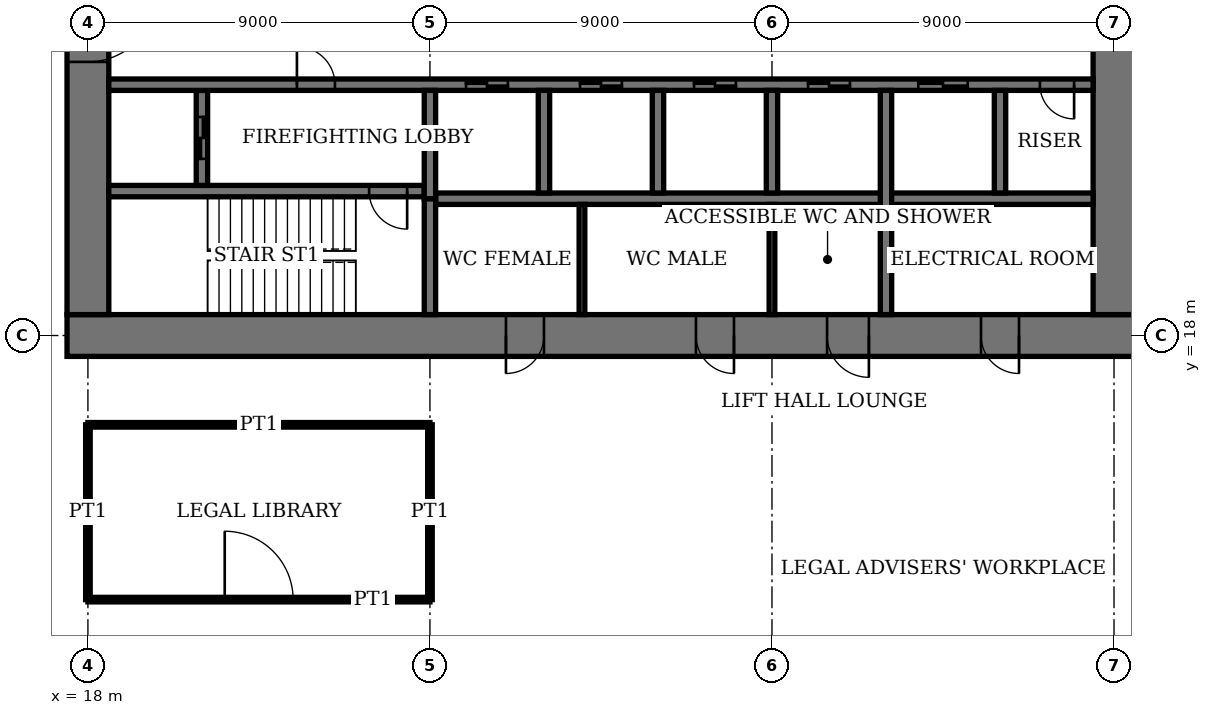
"""IFC4 building model, lengths in metres.
Left out: names, types, materials, properties, quantities, classifications, styles, units other than length and angle.
Written with IfcOpenShell. Run it as: python <this file> out.ifc"""

import sys

from ifc_helpers import new_model, si_unit, direction, frame, frame_2d, origin, place, context, subcontext, project, spatial, rectangle, extrude, element, fill, save


model = new_model("IFC4")
c1 = context("Model", 3, precision=1e-05, world=origin(), true_north=direction((0.0, 1.0)))
c2 = subcontext(c1, "Body", "Model", "MODEL_VIEW")
j1 = project(units=[si_unit("LENGTHUNIT", "METRE"), si_unit("PLANEANGLEUNIT", "RADIAN")], contexts=[c1])
p1 = place(None, origin())
s1 = spatial("IfcSite", under=j1, at=p1, CompositionType="ELEMENT")
p2 = place(p1, origin())
s2 = spatial("IfcBuilding", under=s1, at=p2, CompositionType="ELEMENT")
p3 = place(p2, frame((0.0, 0.0, 259.4)))
s3 = spatial("IfcBuildingStorey", under=s2, at=p3, CompositionType="ELEMENT", Elevation=259.4)
p4 = place(p3, frame((17.45, 18.0, 0.0), z_axis=(0.0, 0.0, 1.0), x_axis=(1.0, 0.0, 0.0)))
e1 = element("IfcWall", 1, at=p4, inside=s3, PredefinedType="SHEAR", context=c2, shape_type="SweptSolid", body=[
    extrude(rectangle(XDim=28.1, YDim=1.1, at=frame_2d((14.05, 0.0))), origin(), (0.0, 0.0, 1.0), 4.0),
])
p5 = place(p4, frame((11.55, 0.0, 0.0)))
e2 = element("IfcOpeningElement", 2, at=p5, cuts=e1, PredefinedType="OPENING", context=c2, shape_type="SweptSolid", body=[
    extrude(rectangle(XDim=1.0, YDim=2.4, at=frame_2d((0.5, 1.2))), frame((0.0, 0.56, 0.0), z_axis=(0.0, -1.0, 0.0), x_axis=(1.0, 0.0, 0.0)), (0.0, 0.0, 1.0), 1.12),
])
p6 = place(p4, frame((16.55, 0.0, 0.0)))
e3 = element("IfcOpeningElement", 3, at=p6, cuts=e1, PredefinedType="OPENING", context=c2, shape_type="SweptSolid", body=[
    extrude(rectangle(XDim=1.0, YDim=2.4, at=frame_2d((0.5, 1.2))), frame((0.0, 0.56, 0.0), z_axis=(0.0, -1.0, 0.0), x_axis=(1.0, 0.0, 0.0)), (0.0, 0.0, 1.0), 1.12),
])
p7 = place(p4, frame((20.0, 0.0, 0.0)))
e4 = element("IfcOpeningElement", 4, at=p7, cuts=e1, PredefinedType="OPENING", context=c2, shape_type="SweptSolid", body=[
    extrude(rectangle(XDim=1.1, YDim=2.4, at=frame_2d((0.55, 1.2))), frame((0.0, 0.56, 0.0), z_axis=(0.0, -1.0, 0.0), x_axis=(1.0, 0.0, 0.0)), (0.0, 0.0, 1.0), 1.12),
])
p8 = place(p4, frame((24.05, 0.0, 0.0)))
e5 = element("IfcOpeningElement", 5, at=p8, cuts=e1, PredefinedType="OPENING", context=c2, shape_type="SweptSolid", body=[
    extrude(rectangle(XDim=1.0, YDim=2.4, at=frame_2d((0.5, 1.2))), frame((0.0, 0.56, 0.0), z_axis=(0.0, -1.0, 0.0), x_axis=(1.0, 0.0, 0.0)), (0.0, 0.0, 1.0), 1.12),
])
p9 = place(p3, frame((18.0, 35.45, 0.0), z_axis=(0.0, 0.0, 1.0), x_axis=(0.0, -1.0, 0.0)))
e6 = element("IfcWall", 6, at=p9, inside=s3, PredefinedType="SHEAR", context=c2, shape_type="SweptSolid", body=[
    extrude(rectangle(XDim=16.9, YDim=1.1, at=frame_2d((8.45, 0.0))), origin(), (0.0, 0.0, 1.0), 4.0),
])
p10 = place(p9, frame((8.45, 0.0, 0.0)))
e7 = element("IfcOpeningElement", 7, at=p10, cuts=e6, PredefinedType="OPENING", context=c2, shape_type="SweptSolid", body=[
    extrude(rectangle(XDim=1.8, YDim=2.4, at=frame_2d((0.9, 1.2))), frame((0.0, 0.56, 0.0), z_axis=(0.0, -1.0, 0.0), x_axis=(1.0, 0.0, 0.0)), (0.0, 0.0, 1.0), 1.12),
])
p11 = place(p3, frame((45.0, 18.55, 0.0), z_axis=(0.0, 0.0, 1.0), x_axis=(0.0, 1.0, 0.0)))
e8 = element("IfcWall", 8, at=p11, inside=s3, PredefinedType="SHEAR", context=c2, shape_type="SweptSolid", body=[
    extrude(rectangle(XDim=16.9, YDim=1.1, at=frame_2d((8.45, 0.0))), origin(), (0.0, 0.0, 1.0), 4.0),
])
p12 = place(p11, frame((8.45, 0.0, 0.0)))
e9 = element("IfcOpeningElement", 9, at=p12, cuts=e8, PredefinedType="OPENING", context=c2, shape_type="SweptSolid", body=[
    extrude(rectangle(XDim=1.8, YDim=2.4, at=frame_2d((0.9, 1.2))), frame((0.0, 0.56, 0.0), z_axis=(0.0, -1.0, 0.0), x_axis=(1.0, 0.0, 0.0)), (0.0, 0.0, 1.0), 1.12),
])
p13 = place(p3, frame((18.55, 21.8, 0.0), z_axis=(0.0, 0.0, 1.0), x_axis=(1.0, 0.0, 0.0)))
e10 = element("IfcWall", 10, at=p13, inside=s3, PredefinedType="SHEAR", context=c2, shape_type="SweptSolid", body=[
    extrude(rectangle(XDim=8.3, YDim=0.3, at=frame_2d((4.15, 0.0))), origin(), (0.0, 0.0, 1.0), 4.0),
])
p14 = place(p13, frame((6.85, 0.0, 0.0)))
e11 = element("IfcOpeningElement", 11, at=p14, cuts=e10, PredefinedType="OPENING", context=c2, shape_type="SweptSolid", body=[
    extrude(rectangle(XDim=1.0, YDim=2.4, at=frame_2d((0.5, 1.2))), frame((0.0, 0.16, 0.0), z_axis=(0.0, -1.0, 0.0), x_axis=(1.0, 0.0, 0.0)), (0.0, 0.0, 1.0), 0.32),
])
p15 = place(p3, frame((27.0, 18.55, 0.0), z_axis=(0.0, 0.0, 1.0), x_axis=(0.0, 1.0, 0.0)))
e12 = element("IfcWall", 12, at=p15, inside=s3, PredefinedType="SHEAR", context=c2, shape_type="SweptSolid", body=[
    extrude(rectangle(XDim=3.05, YDim=0.3, at=frame_2d((1.525, 0.0))), origin(), (0.0, 0.0, 1.0), 4.0),
])
p16 = place(p3, frame((21.0, 21.95, 0.0), z_axis=(0.0, 0.0, 1.0), x_axis=(0.0, 1.0, 0.0)))
e13 = element("IfcWall", 13, at=p16, inside=s3, PredefinedType="SHEAR", context=c2, shape_type="SweptSolid", body=[
    extrude(rectangle(XDim=2.5, YDim=0.3, at=frame_2d((1.25, 0.0))), origin(), (0.0, 0.0, 1.0), 4.0),
])
p17 = place(p16, frame((0.7, 0.0, 0.0)))
e14 = element("IfcOpeningElement", 14, at=p17, cuts=e13, PredefinedType="OPENING", context=c2, shape_type="SweptSolid", body=[
    extrude(rectangle(XDim=1.1, YDim=2.4, at=frame_2d((0.55, 1.2))), frame((0.0, 0.16, 0.0), z_axis=(0.0, -1.0, 0.0), x_axis=(1.0, 0.0, 0.0)), (0.0, 0.0, 1.0), 0.32),
])
p18 = place(p3, frame((18.55, 24.6, 0.0), z_axis=(0.0, 0.0, 1.0), x_axis=(1.0, 0.0, 0.0)))
e15 = element("IfcWall", 15, at=p18, inside=s3, PredefinedType="SHEAR", context=c2, shape_type="SweptSolid", body=[
    extrude(rectangle(XDim=25.9, YDim=0.3, at=frame_2d((12.95, 0.0))), origin(), (0.0, 0.0, 1.0), 4.0),
])
p19 = place(p18, frame((4.95, 0.0, 0.0)))
e16 = element("IfcOpeningElement", 16, at=p19, cuts=e15, PredefinedType="OPENING", context=c2, shape_type="SweptSolid", body=[
    extrude(rectangle(XDim=1.0, YDim=2.4, at=frame_2d((0.5, 1.2))), frame((0.0, 0.16, 0.0), z_axis=(0.0, -1.0, 0.0), x_axis=(1.0, 0.0, 0.0)), (0.0, 0.0, 1.0), 0.32),
])
p20 = place(p18, frame((24.5, 0.0, 0.0)))
e17 = element("IfcOpeningElement", 17, at=p20, cuts=e15, PredefinedType="OPENING", context=c2, shape_type="SweptSolid", body=[
    extrude(rectangle(XDim=0.9, YDim=2.1, at=frame_2d((0.45, 1.05))), frame((0.0, 0.16, 0.0), z_axis=(0.0, -1.0, 0.0), x_axis=(1.0, 0.0, 0.0)), (0.0, 0.0, 1.0), 0.32),
])
p21 = place(p18, frame((9.4, 0.0, 0.0)))
e18 = element("IfcOpeningElement", 18, at=p21, cuts=e15, PredefinedType="OPENING", context=c2, shape_type="SweptSolid", body=[
    extrude(rectangle(XDim=1.1, YDim=2.4, at=frame_2d((0.55, 1.2))), frame((0.0, 0.16, 0.0), z_axis=(0.0, -1.0, 0.0), x_axis=(1.0, 0.0, 0.0)), (0.0, 0.0, 1.0), 0.32),
])
p22 = place(p18, frame((12.4, 0.0, 0.0)))
e19 = element("IfcOpeningElement", 19, at=p22, cuts=e15, PredefinedType="OPENING", context=c2, shape_type="SweptSolid", body=[
    extrude(rectangle(XDim=1.1, YDim=2.4, at=frame_2d((0.55, 1.2))), frame((0.0, 0.16, 0.0), z_axis=(0.0, -1.0, 0.0), x_axis=(1.0, 0.0, 0.0)), (0.0, 0.0, 1.0), 0.32),
])
p23 = place(p18, frame((15.4, 0.0, 0.0)))
e20 = element("IfcOpeningElement", 20, at=p23, cuts=e15, PredefinedType="OPENING", context=c2, shape_type="SweptSolid", body=[
    extrude(rectangle(XDim=1.1, YDim=2.4, at=frame_2d((0.55, 1.2))), frame((0.0, 0.16, 0.0), z_axis=(0.0, -1.0, 0.0), x_axis=(1.0, 0.0, 0.0)), (0.0, 0.0, 1.0), 0.32),
])
p24 = place(p18, frame((18.4, 0.0, 0.0)))
e21 = element("IfcOpeningElement", 21, at=p24, cuts=e15, PredefinedType="OPENING", context=c2, shape_type="SweptSolid", body=[
    extrude(rectangle(XDim=1.1, YDim=2.4, at=frame_2d((0.55, 1.2))), frame((0.0, 0.16, 0.0), z_axis=(0.0, -1.0, 0.0), x_axis=(1.0, 0.0, 0.0)), (0.0, 0.0, 1.0), 0.32),
])
p25 = place(p18, frame((21.3, 0.0, 0.0)))
e22 = element("IfcOpeningElement", 22, at=p25, cuts=e15, PredefinedType="OPENING", context=c2, shape_type="SweptSolid", body=[
    extrude(rectangle(XDim=1.3, YDim=2.4, at=frame_2d((0.65, 1.2))), frame((0.0, 0.16, 0.0), z_axis=(0.0, -1.0, 0.0), x_axis=(1.0, 0.0, 0.0)), (0.0, 0.0, 1.0), 0.32),
])
p26 = place(p3, frame((27.15, 21.6, 0.0), z_axis=(0.0, 0.0, 1.0), x_axis=(1.0, 0.0, 0.0)))
e23 = element("IfcWall", 23, at=p26, inside=s3, PredefinedType="SHEAR", context=c2, shape_type="SweptSolid", body=[
    extrude(rectangle(XDim=17.3, YDim=0.3, at=frame_2d((8.65, 0.0))), origin(), (0.0, 0.0, 1.0), 4.0),
])
for number, where, z_axis, x_axis in (
    (24, (30.0, 21.75, 0.0), (0.0, 0.0, 1.0), (0.0, 1.0, 0.0)),
    (25, (33.0, 21.75, 0.0), (0.0, 0.0, 1.0), (0.0, 1.0, 0.0)),
    (26, (36.0, 21.75, 0.0), (0.0, 0.0, 1.0), (0.0, 1.0, 0.0)),
):
    element("IfcWall", number, at=place(p3, frame(where, z_axis=z_axis, x_axis=x_axis)), inside=s3, PredefinedType="SHEAR", context=c2, shape_type="SweptSolid", body=[
        extrude(rectangle(XDim=2.7, YDim=0.3, at=frame_2d((1.35, 0.0))), origin(), (0.0, 0.0, 1.0), 4.0),
    ])
p27 = place(p3, frame((39.0, 18.55, 0.0), z_axis=(0.0, 0.0, 1.0), x_axis=(0.0, 1.0, 0.0)))
e27 = element("IfcWall", 27, at=p27, inside=s3, PredefinedType="SHEAR", context=c2, shape_type="SweptSolid", body=[
    extrude(rectangle(XDim=5.9, YDim=0.3, at=frame_2d((2.95, 0.0))), origin(), (0.0, 0.0, 1.0), 4.0),
])
p28 = place(p3, frame((42.0, 21.75, 0.0), z_axis=(0.0, 0.0, 1.0), x_axis=(0.0, 1.0, 0.0)))
e28 = element("IfcWall", 28, at=p28, inside=s3, PredefinedType="SHEAR", context=c2, shape_type="SweptSolid", body=[
    extrude(rectangle(XDim=2.7, YDim=0.3, at=frame_2d((1.35, 0.0))), origin(), (0.0, 0.0, 1.0), 4.0),
])
p29 = place(p3, frame((27.0, 21.6, 0.0), z_axis=(0.0, 0.0, 1.0), x_axis=(0.0, 1.0, 0.0)))
e29 = element("IfcWall", 29, at=p29, inside=s3, PredefinedType="SHEAR", context=c2, shape_type="SweptSolid", body=[
    extrude(rectangle(XDim=2.85, YDim=0.3, at=frame_2d((1.425, 0.0))), origin(), (0.0, 0.0, 1.0), 4.0),
])
p30 = place(p3, frame((18.0, 11.05, 0.0), z_axis=(0.0, 0.0, 1.0), x_axis=(1.0, 0.0, 0.0)))
e30 = element("IfcWall", 30, at=p30, inside=s3, PredefinedType="PARTITIONING", context=c2, shape_type="SweptSolid", body=[
    extrude(rectangle(XDim=9.0, YDim=0.12, at=frame_2d((4.5, 0.0))), origin(), (0.0, 0.0, 1.0), 3.75),
])
p31 = place(p30, frame((3.6, 0.0, 0.0)))
e31 = element("IfcOpeningElement", 31, at=p31, cuts=e30, PredefinedType="OPENING", context=c2, shape_type="SweptSolid", body=[
    extrude(rectangle(XDim=1.8, YDim=2.4, at=frame_2d((0.9, 1.2))), frame((0.0, 0.07, 0.0), z_axis=(0.0, -1.0, 0.0), x_axis=(1.0, 0.0, 0.0)), (0.0, 0.0, 1.0), 0.14),
])
p32 = place(p3, frame((18.0, 15.65, 0.0), z_axis=(0.0, 0.0, 1.0), x_axis=(1.0, 0.0, 0.0)))
e32 = element("IfcWall", 32, at=p32, inside=s3, PredefinedType="PARTITIONING", context=c2, shape_type="SweptSolid", body=[
    extrude(rectangle(XDim=9.0, YDim=0.12, at=frame_2d((4.5, 0.0))), origin(), (0.0, 0.0, 1.0), 3.75),
])
for number, where, z_axis, x_axis in (
    (33, (18.0, 11.05, 0.0), (0.0, 0.0, 1.0), (0.0, 1.0, 0.0)),
    (34, (27.0, 11.05, 0.0), (0.0, 0.0, 1.0), (0.0, 1.0, 0.0)),
):
    element("IfcWall", number, at=place(p3, frame(where, z_axis=z_axis, x_axis=x_axis)), inside=s3, PredefinedType="PARTITIONING", context=c2, shape_type="SweptSolid", body=[
        extrude(rectangle(XDim=4.6, YDim=0.12, at=frame_2d((2.3, 0.0))), origin(), (0.0, 0.0, 1.0), 3.05),
    ])
for number, where, z_axis, x_axis in (
    (35, (31.0, 18.55, 0.0), (0.0, 0.0, 1.0), (0.0, 1.0, 0.0)),
    (36, (36.0, 18.55, 0.0), (0.0, 0.0, 1.0), (0.0, 1.0, 0.0)),
):
    element("IfcWall", number, at=place(p3, frame(where, z_axis=z_axis, x_axis=x_axis)), inside=s3, PredefinedType="PARTITIONING", context=c2, shape_type="SweptSolid", body=[
        extrude(rectangle(XDim=2.9, YDim=0.15, at=frame_2d((1.45, 0.0))), origin(), (0.0, 0.0, 1.0), 3.75),
    ])
p33 = place(p10, origin())
e37 = element("IfcDoor", 37, at=p33, inside=s3, OperationType="DOUBLE_DOOR_DOUBLE_SWING", PredefinedType="DOOR", context=c2, shape_type="SweptSolid", body=[
    extrude(rectangle(XDim=1.8, YDim=2.4, at=frame_2d((0.9, 1.2))), frame((0.0, 0.03, 0.0), z_axis=(0.0, -1.0, 0.0), x_axis=(1.0, 0.0, 0.0)), (0.0, 0.0, 1.0), 0.06),
    extrude(rectangle(XDim=0.04, YDim=2.4, at=frame_2d((0.02, 1.2))), frame((0.0, 0.55, 0.0), z_axis=(0.0, -1.0, 0.0), x_axis=(1.0, 0.0, 0.0)), (0.0, 0.0, 1.0), 1.1),
    extrude(rectangle(XDim=0.04, YDim=2.4, at=frame_2d((1.78, 1.2))), frame((0.0, 0.55, 0.0), z_axis=(0.0, -1.0, 0.0), x_axis=(1.0, 0.0, 0.0)), (0.0, 0.0, 1.0), 1.1),
    extrude(rectangle(XDim=1.8, YDim=0.04, at=frame_2d((0.9, 2.38))), frame((0.0, 0.55, 0.0), z_axis=(0.0, -1.0, 0.0), x_axis=(1.0, 0.0, 0.0)), (0.0, 0.0, 1.0), 1.1),
])
fill(e7, e37)
p34 = place(p5, origin())
e38 = element("IfcDoor", 38, at=p34, inside=s3, OperationType="SINGLE_SWING_LEFT", PredefinedType="DOOR", context=c2, shape_type="SweptSolid", body=[
    extrude(rectangle(XDim=1.0, YDim=2.4, at=frame_2d((0.5, 1.2))), frame((0.0, 0.025, 0.0), z_axis=(0.0, -1.0, 0.0), x_axis=(1.0, 0.0, 0.0)), (0.0, 0.0, 1.0), 0.05),
    extrude(rectangle(XDim=0.04, YDim=2.4, at=frame_2d((0.02, 1.2))), frame((0.0, 0.4, 0.0), z_axis=(0.0, -1.0, 0.0), x_axis=(1.0, 0.0, 0.0)), (0.0, 0.0, 1.0), 0.8),
    extrude(rectangle(XDim=0.04, YDim=2.4, at=frame_2d((0.98, 1.2))), frame((0.0, 0.4, 0.0), z_axis=(0.0, -1.0, 0.0), x_axis=(1.0, 0.0, 0.0)), (0.0, 0.0, 1.0), 0.8),
    extrude(rectangle(XDim=1.0, YDim=0.04, at=frame_2d((0.5, 2.38))), frame((0.0, 0.4, 0.0), z_axis=(0.0, -1.0, 0.0), x_axis=(1.0, 0.0, 0.0)), (0.0, 0.0, 1.0), 0.8),
])
fill(e2, e38)
p35 = place(p6, origin())
e39 = element("IfcDoor", 39, at=p35, inside=s3, OperationType="SINGLE_SWING_RIGHT", PredefinedType="DOOR", context=c2, shape_type="SweptSolid", body=[
    extrude(rectangle(XDim=1.0, YDim=2.4, at=frame_2d((0.5, 1.2))), frame((0.0, 0.025, 0.0), z_axis=(0.0, -1.0, 0.0), x_axis=(1.0, 0.0, 0.0)), (0.0, 0.0, 1.0), 0.05),
    extrude(rectangle(XDim=0.04, YDim=2.4, at=frame_2d((0.02, 1.2))), frame((0.0, 0.4, 0.0), z_axis=(0.0, -1.0, 0.0), x_axis=(1.0, 0.0, 0.0)), (0.0, 0.0, 1.0), 0.8),
    extrude(rectangle(XDim=0.04, YDim=2.4, at=frame_2d((0.98, 1.2))), frame((0.0, 0.4, 0.0), z_axis=(0.0, -1.0, 0.0), x_axis=(1.0, 0.0, 0.0)), (0.0, 0.0, 1.0), 0.8),
    extrude(rectangle(XDim=1.0, YDim=0.04, at=frame_2d((0.5, 2.38))), frame((0.0, 0.4, 0.0), z_axis=(0.0, -1.0, 0.0), x_axis=(1.0, 0.0, 0.0)), (0.0, 0.0, 1.0), 0.8),
])
fill(e3, e39)
p36 = place(p7, origin())
e40 = element("IfcDoor", 40, at=p36, inside=s3, OperationType="SINGLE_SWING_RIGHT", PredefinedType="DOOR", context=c2, shape_type="SweptSolid", body=[
    extrude(rectangle(XDim=1.1, YDim=2.4, at=frame_2d((0.55, 1.2))), frame((0.0, 0.025, 0.0), z_axis=(0.0, -1.0, 0.0), x_axis=(1.0, 0.0, 0.0)), (0.0, 0.0, 1.0), 0.05),
    extrude(rectangle(XDim=0.04, YDim=2.4, at=frame_2d((0.02, 1.2))), frame((0.0, 0.44, 0.0), z_axis=(0.0, -1.0, 0.0), x_axis=(1.0, 0.0, 0.0)), (0.0, 0.0, 1.0), 0.88),
    extrude(rectangle(XDim=0.04, YDim=2.4, at=frame_2d((1.08, 1.2))), frame((0.0, 0.44, 0.0), z_axis=(0.0, -1.0, 0.0), x_axis=(1.0, 0.0, 0.0)), (0.0, 0.0, 1.0), 0.88),
    extrude(rectangle(XDim=1.1, YDim=0.04, at=frame_2d((0.55, 2.38))), frame((0.0, 0.44, 0.0), z_axis=(0.0, -1.0, 0.0), x_axis=(1.0, 0.0, 0.0)), (0.0, 0.0, 1.0), 0.88),
])
fill(e4, e40)
p37 = place(p8, origin())
e41 = element("IfcDoor", 41, at=p37, inside=s3, OperationType="SINGLE_SWING_RIGHT", PredefinedType="DOOR", context=c2, shape_type="SweptSolid", body=[
    extrude(rectangle(XDim=1.0, YDim=2.4, at=frame_2d((0.5, 1.2))), frame((0.0, 0.025, 0.0), z_axis=(0.0, -1.0, 0.0), x_axis=(1.0, 0.0, 0.0)), (0.0, 0.0, 1.0), 0.05),
    extrude(rectangle(XDim=0.04, YDim=2.4, at=frame_2d((0.02, 1.2))), frame((0.0, 0.4, 0.0), z_axis=(0.0, -1.0, 0.0), x_axis=(1.0, 0.0, 0.0)), (0.0, 0.0, 1.0), 0.8),
    extrude(rectangle(XDim=0.04, YDim=2.4, at=frame_2d((0.98, 1.2))), frame((0.0, 0.4, 0.0), z_axis=(0.0, -1.0, 0.0), x_axis=(1.0, 0.0, 0.0)), (0.0, 0.0, 1.0), 0.8),
    extrude(rectangle(XDim=1.0, YDim=0.04, at=frame_2d((0.5, 2.38))), frame((0.0, 0.4, 0.0), z_axis=(0.0, -1.0, 0.0), x_axis=(1.0, 0.0, 0.0)), (0.0, 0.0, 1.0), 0.8),
])
fill(e5, e41)
p38 = place(p14, origin())
e42 = element("IfcDoor", 42, at=p38, inside=s3, OperationType="SINGLE_SWING_RIGHT", PredefinedType="DOOR", context=c2, shape_type="SweptSolid", body=[
    extrude(rectangle(XDim=1.0, YDim=2.4, at=frame_2d((0.5, 1.2))), frame((0.0, 0.03, 0.0), z_axis=(0.0, -1.0, 0.0), x_axis=(1.0, 0.0, 0.0)), (0.0, 0.0, 1.0), 0.06),
])
fill(e11, e42)
p39 = place(p19, origin())
e43 = element("IfcDoor", 43, at=p39, inside=s3, OperationType="SINGLE_SWING_RIGHT", PredefinedType="DOOR", context=c2, shape_type="SweptSolid", body=[
    extrude(rectangle(XDim=1.0, YDim=2.4, at=frame_2d((0.5, 1.2))), frame((0.0, 0.03, 0.0), z_axis=(0.0, -1.0, 0.0), x_axis=(1.0, 0.0, 0.0)), (0.0, 0.0, 1.0), 0.06),
])
fill(e16, e43)
p40 = place(p20, origin())
e44 = element("IfcDoor", 44, at=p40, inside=s3, OperationType="SINGLE_SWING_RIGHT", PredefinedType="DOOR", context=c2, shape_type="SweptSolid", body=[
    extrude(rectangle(XDim=0.9, YDim=2.1, at=frame_2d((0.45, 1.05))), frame((0.0, 0.03, 0.0), z_axis=(0.0, -1.0, 0.0), x_axis=(1.0, 0.0, 0.0)), (0.0, 0.0, 1.0), 0.06),
])
fill(e17, e44)
p41 = place(p31, origin())
e45 = element("IfcDoor", 45, at=p41, inside=s3, OperationType="DOUBLE_DOOR_SINGLE_SWING", PredefinedType="DOOR", context=c2, shape_type="SweptSolid", body=[
    extrude(rectangle(XDim=1.8, YDim=2.4, at=frame_2d((0.9, 1.2))), frame((0.0, 0.025, 0.0), z_axis=(0.0, -1.0, 0.0), x_axis=(1.0, 0.0, 0.0)), (0.0, 0.0, 1.0), 0.05),
])
fill(e31, e45)
p42 = place(p21, origin())
e46 = element("IfcDoor", 46, at=p42, inside=s3, OperationType="DOUBLE_DOOR_SLIDING", PredefinedType="DOOR", context=c2, shape_type="SweptSolid", body=[
    extrude(rectangle(XDim=1.1, YDim=2.4, at=frame_2d((0.55, 1.2))), frame((0.0, 0.02, 0.0), z_axis=(0.0, -1.0, 0.0), x_axis=(1.0, 0.0, 0.0)), (0.0, 0.0, 1.0), 0.04),
])
fill(e18, e46)
p43 = place(p22, origin())
e47 = element("IfcDoor", 47, at=p43, inside=s3, OperationType="DOUBLE_DOOR_SLIDING", PredefinedType="DOOR", context=c2, shape_type="SweptSolid", body=[
    extrude(rectangle(XDim=1.1, YDim=2.4, at=frame_2d((0.55, 1.2))), frame((0.0, 0.02, 0.0), z_axis=(0.0, -1.0, 0.0), x_axis=(1.0, 0.0, 0.0)), (0.0, 0.0, 1.0), 0.04),
])
fill(e19, e47)
p44 = place(p23, origin())
e48 = element("IfcDoor", 48, at=p44, inside=s3, OperationType="DOUBLE_DOOR_SLIDING", PredefinedType="DOOR", context=c2, shape_type="SweptSolid", body=[
    extrude(rectangle(XDim=1.1, YDim=2.4, at=frame_2d((0.55, 1.2))), frame((0.0, 0.02, 0.0), z_axis=(0.0, -1.0, 0.0), x_axis=(1.0, 0.0, 0.0)), (0.0, 0.0, 1.0), 0.04),
])
fill(e20, e48)
p45 = place(p24, origin())
e49 = element("IfcDoor", 49, at=p45, inside=s3, OperationType="DOUBLE_DOOR_SLIDING", PredefinedType="DOOR", context=c2, shape_type="SweptSolid", body=[
    extrude(rectangle(XDim=1.1, YDim=2.4, at=frame_2d((0.55, 1.2))), frame((0.0, 0.02, 0.0), z_axis=(0.0, -1.0, 0.0), x_axis=(1.0, 0.0, 0.0)), (0.0, 0.0, 1.0), 0.04),
])
fill(e21, e49)
p46 = place(p25, origin())
e50 = element("IfcDoor", 50, at=p46, inside=s3, OperationType="DOUBLE_DOOR_SLIDING", PredefinedType="DOOR", context=c2, shape_type="SweptSolid", body=[
    extrude(rectangle(XDim=1.3, YDim=2.4, at=frame_2d((0.65, 1.2))), frame((0.0, 0.02, 0.0), z_axis=(0.0, -1.0, 0.0), x_axis=(1.0, 0.0, 0.0)), (0.0, 0.0, 1.0), 0.04),
])
fill(e22, e50)
p47 = place(p17, origin())
e51 = element("IfcDoor", 51, at=p47, inside=s3, OperationType="DOUBLE_DOOR_SLIDING", PredefinedType="DOOR", context=c2, shape_type="SweptSolid", body=[
    extrude(rectangle(XDim=1.1, YDim=2.4, at=frame_2d((0.55, 1.2))), frame((0.0, 0.03, 0.0), z_axis=(0.0, -1.0, 0.0), x_axis=(1.0, 0.0, 0.0)), (0.0, 0.0, 1.0), 0.06),
])
fill(e14, e51)
save(model, sys.argv[1])
